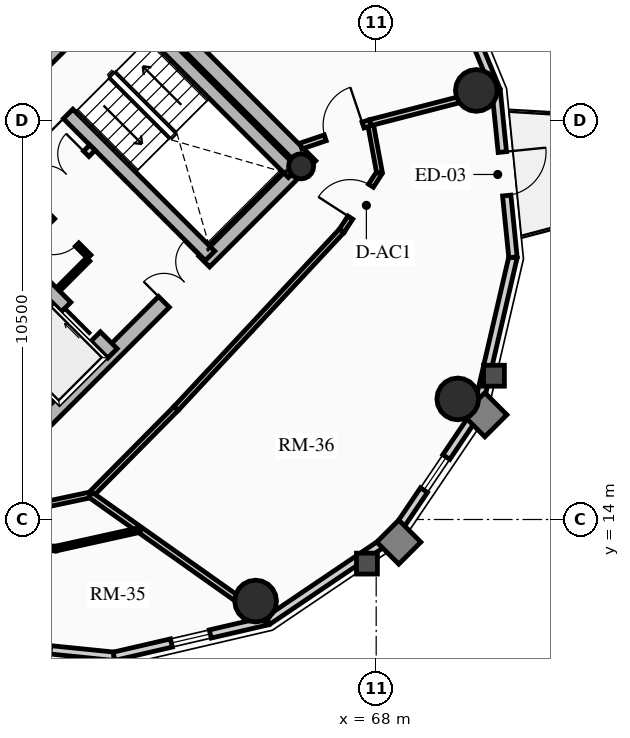
"""IFC4 building model, lengths in metres.
Left out: names, types, materials, properties, quantities, classifications, styles, units other than length and angle.
Written with IfcOpenShell. Run it as: python <this file> out.ifc"""

import sys

from ifc_helpers import new_model, si_unit, direction, frame, frame_2d, origin, origin_2d, place, context, subcontext, project, spatial, rectangle, circle, hollow_circle, extrude, source, transform, mapped, element, fill, save


model = new_model("IFC4")
c1 = context("Model", 3, precision=1e-05, world=origin(), true_north=direction((0.0, 1.0)))
c2 = subcontext(c1, "Body", "Model", "MODEL_VIEW")
j1 = project(units=[si_unit("LENGTHUNIT", "METRE"), si_unit("PLANEANGLEUNIT", "RADIAN")], contexts=[c1])
p1 = place(None, origin())
s1 = spatial("IfcSite", under=j1, at=p1, CompositionType="ELEMENT")
p2 = place(p1, origin())
s2 = spatial("IfcBuilding", under=s1, at=p2, CompositionType="ELEMENT")
p3 = place(p2, frame((0.0, 0.0, 226.05)))
s3 = spatial("IfcBuildingStorey", under=s2, at=p3, CompositionType="ELEMENT", Elevation=226.05)
p4 = place(p3, frame((66.268, 23.298, 0.0), z_axis=(0.0, 0.0, 1.0), x_axis=(-0.707106781187, 0.707106781187, 0.0)))
e1 = element("IfcWall", 1, at=p4, inside=s3, PredefinedType="SHEAR", context=c2, shape_type="SweptSolid", body=[
    extrude(rectangle(XDim=14.1, YDim=0.4, at=frame_2d((7.05, 0.0))), origin(), (0.0, 0.0, 1.0), 3.2),
])
p5 = place(p3, frame((58.561, 15.873, 0.0), z_axis=(0.0, 0.0, 1.0), x_axis=(0.707106781187, 0.707106781187, 0.0)))
e2 = element("IfcWall", 2, at=p5, inside=s3, PredefinedType="SHEAR", context=c2, shape_type="SweptSolid", body=[
    extrude(rectangle(XDim=10.7, YDim=0.4, at=frame_2d((5.35, 0.0))), origin(), (0.0, 0.0, 1.0), 3.2),
])
m1 = source(origin(), c2, "Body", "SweptSolid", [
    extrude(rectangle(XDim=1.5, YDim=2.02, at=frame_2d((0.75, 1.01))), frame((0.0, 0.21, 0.0), z_axis=(0.0, -1.0, 0.0), x_axis=(1.0, 0.0, 0.0)), (0.0, 0.0, 1.0), 0.42),
])
p6 = place(p5, frame((5.45, 0.0, 0.0)))
e3 = element("IfcOpeningElement", 3, at=p6, cuts=e2, PredefinedType="OPENING", context=c2, shape_type="MappedRepresentation", body=[
    mapped(m1, transform((0.0, 0.0, 0.0), x_axis=(1.0, 0.0, 0.0), y_axis=(0.0, 1.0, 0.0), z_axis=(0.0, 0.0, 1.0), scale=1.0)),
])
p7 = place(p3, frame((61.06, 18.373, 0.0), z_axis=(0.0, 0.0, 1.0), x_axis=(-0.707106781187, 0.707106781187, 0.0)))
e4 = element("IfcWall", 4, at=p7, inside=s3, PredefinedType="SHEAR", context=c2, shape_type="SweptSolid", body=[
    extrude(rectangle(XDim=13.7, YDim=0.35, at=frame_2d((6.85, 0.0))), origin(), (0.0, 0.0, 1.0), 3.2),
])
m2 = source(origin(), c2, "Body", "SweptSolid", [
    extrude(rectangle(XDim=1.1, YDim=2.015, at=frame_2d((0.55, 1.007))), frame((0.0, 0.185, 0.0), z_axis=(0.0, -1.0, 0.0), x_axis=(1.0, 0.0, 0.0)), (0.0, 0.0, 1.0), 0.37),
])
p8 = place(p7, frame((4.85, 0.0, 0.0)))
e5 = element("IfcOpeningElement", 5, at=p8, cuts=e4, PredefinedType="OPENING", context=c2, shape_type="MappedRepresentation", body=[
    mapped(m2, transform((0.0, 0.0, 0.0), x_axis=(1.0, 0.0, 0.0), y_axis=(0.0, 1.0, 0.0), z_axis=(0.0, 0.0, 1.0), scale=1.0)),
])
p9 = place(p7, frame((0.625, 0.0, 0.0)))
e6 = element("IfcOpeningElement", 6, at=p9, cuts=e4, PredefinedType="OPENING", context=c2, shape_type="MappedRepresentation", body=[
    mapped(m2, transform((0.0, 0.0, 0.0), x_axis=(1.0, 0.0, 0.0), y_axis=(0.0, 1.0, 0.0), z_axis=(0.0, 0.0, 1.0), scale=1.0)),
])
p10 = place(p7, frame((2.625, 0.0, 0.0)))
e7 = element("IfcOpeningElement", 7, at=p10, cuts=e4, PredefinedType="OPENING", context=c2, shape_type="MappedRepresentation", body=[
    mapped(m2, transform((0.0, 0.0, 0.0), x_axis=(1.0, 0.0, 0.0), y_axis=(0.0, 1.0, 0.0), z_axis=(0.0, 0.0, 1.0), scale=1.0)),
])
m3 = source(origin(), c2, "Body", "SweptSolid", [
    extrude(rectangle(XDim=1.15, YDim=2.02, at=frame_2d((0.575, 1.01))), frame((0.0, 0.185, 0.0), z_axis=(0.0, -1.0, 0.0), x_axis=(1.0, 0.0, 0.0)), (0.0, 0.0, 1.0), 0.37),
])
p11 = place(p7, frame((7.27, 0.0, 0.0)))
e8 = element("IfcOpeningElement", 8, at=p11, cuts=e4, PredefinedType="OPENING", context=c2, shape_type="MappedRepresentation", body=[
    mapped(m3, transform((0.0, 0.0, 0.0), x_axis=(1.0, 0.0, 0.0), y_axis=(0.0, 1.0, 0.0), z_axis=(0.0, 0.0, 1.0), scale=1.0)),
])
p12 = place(p3, frame((63.627, 20.94, 0.0), z_axis=(0.0, 0.0, 1.0), x_axis=(-0.707119496762, 0.707094065383, 0.0)))
e9 = element("IfcWall", 9, at=p12, inside=s3, PredefinedType="SHEAR", context=c2, shape_type="SweptSolid", body=[
    extrude(rectangle(XDim=9.6, YDim=0.35, at=frame_2d((4.8, 0.0))), origin(), (0.0, 0.0, 1.0), 3.2),
])
p13 = place(p12, frame((5.28, 0.0, 0.0)))
e10 = element("IfcOpeningElement", 10, at=p13, cuts=e9, PredefinedType="OPENING", context=c2, shape_type="MappedRepresentation", body=[
    mapped(m3, transform((0.0, 0.0, 0.0), x_axis=(1.0, 0.0, 0.0), y_axis=(0.0, 1.0, 0.0), z_axis=(0.0, 0.0, 1.0), scale=1.0)),
])
p14 = place(p3, frame((65.812, 23.125, 0.0), z_axis=(0.0, 0.0, 1.0), x_axis=(-0.707106781187, 0.707106781187, 0.0)))
e11 = element("IfcWall", 11, at=p14, inside=s3, PredefinedType="SHEAR", context=c2, shape_type="SweptSolid", body=[
    extrude(rectangle(XDim=6.695, YDim=0.35, at=frame_2d((3.348, 0.0))), origin(), (0.0, 0.0, 1.0), 3.2),
])
p15 = place(p3, frame((58.893, 25.674, 0.0), z_axis=(0.0, 0.0, 1.0), x_axis=(0.707106781187, 0.707106781187, 0.0)))
e12 = element("IfcWall", 12, at=p15, inside=s3, PredefinedType="SHEAR", context=c2, shape_type="SweptSolid", body=[
    extrude(rectangle(XDim=3.285, YDim=0.35, at=frame_2d((1.643, 0.0))), origin(), (0.0, 0.0, 1.0), 3.2),
])
p16 = place(p3, frame((66.024, 23.294, 0.0), z_axis=(0.0, 0.0, 1.0), x_axis=(0.707106781187, 0.707106781187, 0.0)))
e13 = element("IfcColumn", 13, at=p16, inside=s3, PredefinedType="COLUMN", context=c2, shape_type="SweptSolid", body=[
    extrude(hollow_circle(Radius=0.33, WallThickness=0.025, at=origin_2d()), origin(), (0.0, 0.0, 1.0), 3.2),
])
for number, where, z_axis, x_axis in (
    (14, (64.827, 11.854, 0.0), (0.0, 0.0, 1.0), (1.0, 0.0, 0.0)),
    (15, (70.146, 17.173, 0.0), (0.0, 0.0, 1.0), (1.0, 0.0, 0.0)),
    (16, (70.635, 25.291, 0.0), (0.0, 0.0, 1.0), (1.0, 0.0, 0.0)),
):
    element("IfcColumn", number, at=place(p3, frame(where, z_axis=z_axis, x_axis=x_axis)), inside=s3, PredefinedType="USERDEFINED", context=c2, shape_type="SweptSolid", body=[
        extrude(circle(Radius=0.55, at=origin_2d()), origin(), (0.0, 0.0, 1.0), 3.2),
    ])
p17 = place(p3, frame((61.1, 10.401, 0.0), z_axis=(0.0, 0.0, 1.0), x_axis=(-0.994929930991, 0.100570534541, 0.0)))
e17 = element("IfcWall", 17, at=p17, inside=s3, PredefinedType="SOLIDWALL", context=c2, shape_type="SweptSolid", body=[
    extrude(rectangle(XDim=4.418, YDim=0.22, at=frame_2d((2.209, 0.0))), origin(), (0.0, 0.0, 1.0), 2.612),
])
m4 = source(origin(), c2, "Body", "SweptSolid", [
    extrude(rectangle(XDim=1.05, YDim=1.3, at=frame_2d((0.525, 0.65))), frame((0.0, 0.12, 0.0), z_axis=(0.0, -1.0, 0.0), x_axis=(1.0, 0.0, 0.0)), (0.0, 0.0, 1.0), 0.24),
])
p18 = place(p17, frame((1.684, 0.0, 0.65)))
e18 = element("IfcOpeningElement", 18, at=p18, cuts=e17, PredefinedType="OPENING", context=c2, shape_type="MappedRepresentation", body=[
    mapped(m4, transform((0.0, 0.0, 0.0), x_axis=(1.0, 0.0, 0.0), y_axis=(0.0, 1.0, 0.0), z_axis=(0.0, 0.0, 1.0), scale=1.0)),
])
p19 = place(p3, frame((65.144, 11.337, 0.0), z_axis=(0.0, 0.0, 1.0), x_axis=(-0.974249228678, -0.225473813158, 0.0)))
e19 = element("IfcWall", 19, at=p19, inside=s3, PredefinedType="SOLIDWALL", context=c2, shape_type="SweptSolid", body=[
    extrude(rectangle(XDim=4.15, YDim=0.22, at=frame_2d((2.075, 0.0))), origin(), (0.0, 0.0, 1.0), 2.612),
])
p20 = place(p19, frame((1.55, 0.0, 0.65)))
e20 = element("IfcOpeningElement", 20, at=p20, cuts=e19, PredefinedType="OPENING", context=c2, shape_type="MappedRepresentation", body=[
    mapped(m4, transform((0.0, 0.0, 0.0), x_axis=(1.0, 0.0, 0.0), y_axis=(0.0, 1.0, 0.0), z_axis=(0.0, 0.0, 1.0), scale=1.0)),
])
p21 = place(p3, frame((68.439, 13.561, 0.0), z_axis=(0.0, 0.0, 1.0), x_axis=(-0.828833723692, -0.559495003079, 0.0)))
e21 = element("IfcWall", 21, at=p21, inside=s3, PredefinedType="SOLIDWALL", context=c2, shape_type="SweptSolid", body=[
    extrude(rectangle(XDim=3.976, YDim=0.22, at=frame_2d((1.988, 0.0))), origin(), (0.0, 0.0, 1.0), 2.612),
])
p22 = place(p3, frame((70.663, 16.856, 0.0), z_axis=(0.0, 0.0, 1.0), x_axis=(-0.559495003079, -0.828833723692, 0.0)))
e22 = element("IfcWall", 22, at=p22, inside=s3, PredefinedType="SOLIDWALL", context=c2, shape_type="SweptSolid", body=[
    extrude(rectangle(XDim=3.976, YDim=0.22, at=frame_2d((1.988, 0.0))), origin(), (0.0, 0.0, 1.0), 2.612),
])
p23 = place(p22, frame((1.463, 0.0, 0.65)))
e23 = element("IfcOpeningElement", 23, at=p23, cuts=e22, PredefinedType="OPENING", context=c2, shape_type="MappedRepresentation", body=[
    mapped(m4, transform((0.0, 0.0, 0.0), x_axis=(1.0, 0.0, 0.0), y_axis=(0.0, 1.0, 0.0), z_axis=(0.0, 0.0, 1.0), scale=1.0)),
])
p24 = place(p3, frame((71.599, 20.9, 0.0), z_axis=(0.0, 0.0, 1.0), x_axis=(-0.225473813158, -0.974249228678, 0.0)))
e24 = element("IfcWall", 24, at=p24, inside=s3, PredefinedType="SOLIDWALL", context=c2, shape_type="SweptSolid", body=[
    extrude(rectangle(XDim=4.15, YDim=0.22, at=frame_2d((2.075, 0.0))), origin(), (0.0, 0.0, 1.0), 2.612),
])
p25 = place(p3, frame((71.155, 25.295, 0.0), z_axis=(0.0, 0.0, 1.0), x_axis=(0.100570534541, -0.994929930991, 0.0)))
e25 = element("IfcWall", 25, at=p25, inside=s3, PredefinedType="SOLIDWALL", context=c2, shape_type="SweptSolid", body=[
    extrude(rectangle(XDim=4.418, YDim=0.22, at=frame_2d((2.209, 0.0))), origin(), (0.0, 0.0, 1.0), 2.612),
])
m5 = source(origin(), c2, "Body", "SweptSolid", [
    extrude(rectangle(XDim=1.15, YDim=2.005, at=frame_2d((0.575, 1.002))), frame((0.0, 0.12, 0.0), z_axis=(0.0, -1.0, 0.0), x_axis=(1.0, 0.0, 0.0)), (0.0, 0.0, 1.0), 0.24),
])
p26 = place(p25, frame((1.634, 0.0, 0.0)))
e26 = element("IfcOpeningElement", 26, at=p26, cuts=e25, PredefinedType="OPENING", context=c2, shape_type="MappedRepresentation", body=[
    mapped(m5, transform((0.0, 0.0, 0.0), x_axis=(1.0, 0.0, 0.0), y_axis=(0.0, 1.0, 0.0), z_axis=(0.0, 0.0, 1.0), scale=1.0)),
])
p27 = place(p3, frame((69.374, 29.613, 0.0), z_axis=(0.0, 0.0, 1.0), x_axis=(0.381309704956, -0.924447353237, 0.0)))
e27 = element("IfcWall", 27, at=p27, inside=s3, PredefinedType="SOLIDWALL", context=c2, shape_type="SweptSolid", body=[
    extrude(rectangle(XDim=4.671, YDim=0.22, at=frame_2d((2.335, 0.0))), origin(), (0.0, 0.0, 1.0), 2.612),
])
p28 = place(p3, frame((58.214, 21.467, 0.0), z_axis=(0.0, 0.0, 1.0), x_axis=(0.707106781187, 0.707106781187, 0.0)))
e28 = element("IfcWall", 28, at=p28, inside=s3, PredefinedType="PARTITIONING", context=c2, shape_type="SweptSolid", body=[
    extrude(rectangle(XDim=3.28, YDim=0.2, at=frame_2d((1.64, 0.0))), origin(), (0.0, 0.0, 1.0), 2.975),
])
m6 = source(origin(), c2, "Body", "SweptSolid", [
    extrude(rectangle(XDim=1.5, YDim=2.02, at=frame_2d((0.75, 1.01))), frame((0.0, 0.11, 0.0), z_axis=(0.0, -1.0, 0.0), x_axis=(1.0, 0.0, 0.0)), (0.0, 0.0, 1.0), 0.22),
])
p29 = place(p28, frame((1.55, 0.0, 0.0)))
e29 = element("IfcOpeningElement", 29, at=p29, cuts=e28, PredefinedType="OPENING", context=c2, shape_type="MappedRepresentation", body=[
    mapped(m6, transform((0.0, 0.0, 0.0), x_axis=(1.0, 0.0, 0.0), y_axis=(0.0, 1.0, 0.0), z_axis=(0.0, 0.0, 1.0), scale=1.0)),
])
p30 = place(p3, frame((60.448, 20.915, 0.0), z_axis=(0.0, 0.0, 1.0), x_axis=(-0.707106781187, 0.707106781187, 0.0)))
e30 = element("IfcWall", 30, at=p30, inside=s3, PredefinedType="PARTITIONING", context=c2, shape_type="SweptSolid", body=[
    extrude(rectangle(XDim=1.87, YDim=0.125, at=frame_2d((0.935, 0.0))), origin(), (0.0, 0.0, 1.0), 2.975),
])
m7 = source(origin(), c2, "Body", "SweptSolid", [
    extrude(rectangle(XDim=0.9, YDim=2.005, at=frame_2d((0.45, 1.002))), frame((0.0, 0.073, 0.0), z_axis=(0.0, -1.0, 0.0), x_axis=(1.0, 0.0, 0.0)), (0.0, 0.0, 1.0), 0.145),
])
p31 = place(p30, frame((0.45, 0.0, 0.0)))
e31 = element("IfcOpeningElement", 31, at=p31, cuts=e30, PredefinedType="OPENING", context=c2, shape_type="MappedRepresentation", body=[
    mapped(m7, transform((0.0, 0.0, 0.0), x_axis=(1.0, 0.0, 0.0), y_axis=(0.0, 1.0, 0.0), z_axis=(0.0, 0.0, 1.0), scale=1.0)),
])
p32 = place(p3, frame((59.643, 20.066, 0.0), z_axis=(0.0, 0.0, 1.0), x_axis=(0.707106781187, 0.707106781187, 0.0)))
e32 = element("IfcWall", 32, at=p32, inside=s3, PredefinedType="PARTITIONING", context=c2, shape_type="SweptSolid", body=[
    extrude(rectangle(XDim=1.1, YDim=0.125, at=frame_2d((0.55, 0.0))), origin(), (0.0, 0.0, 1.0), 2.975),
])
p33 = place(p3, frame((58.983, 14.331, 0.0), z_axis=(0.0, 0.0, 1.0), x_axis=(0.978328007546, 0.207061125397, 0.0)))
e33 = element("IfcWall", 33, at=p33, inside=s3, PredefinedType="PARTITIONING", context=c2, shape_type="SweptSolid", body=[
    extrude(rectangle(XDim=1.534, YDim=0.15, at=frame_2d((0.767, 0.0))), origin(), (0.0, 0.0, 1.0), 2.545),
])
p34 = place(p3, frame((60.484, 14.648, 0.0), z_axis=(0.0, 0.0, 1.0), x_axis=(0.703398221944, 0.710795991383, 0.0)))
e34 = element("IfcWall", 34, at=p34, inside=s3, PredefinedType="PARTITIONING", context=c2, shape_type="SweptSolid", body=[
    extrude(rectangle(XDim=3.201, YDim=0.15, at=frame_2d((1.601, 0.0))), origin(), (0.0, 0.0, 1.0), 2.612),
])
p35 = place(p3, frame((62.736, 16.924, 0.0), z_axis=(0.0, 0.0, 1.0), x_axis=(0.681946700833, 0.731401871219, 0.0)))
e35 = element("IfcWall", 35, at=p35, inside=s3, PredefinedType="PARTITIONING", context=c2, shape_type="SweptSolid", body=[
    extrude(rectangle(XDim=6.393, YDim=0.15, at=frame_2d((3.196, 0.0))), origin(), (0.0, 0.0, 1.0), 2.545),
])
p36 = place(p3, frame((67.095, 21.6, 0.0), z_axis=(0.0, 0.0, 1.0), x_axis=(0.543773190184, 0.839232219137, 0.0)))
e36 = element("IfcWall", 36, at=p36, inside=s3, PredefinedType="PARTITIONING", context=c2, shape_type="SweptSolid", body=[
    extrude(rectangle(XDim=1.823, YDim=0.15, at=frame_2d((0.911, 0.0))), origin(), (0.0, 0.0, 1.0), 2.545),
])
m8 = source(origin(), c2, "Body", "SweptSolid", [
    extrude(rectangle(XDim=1.0, YDim=2.015, at=frame_2d((0.5, 1.007))), frame((0.0, 0.085, 0.0), z_axis=(0.0, -1.0, 0.0), x_axis=(1.0, 0.0, 0.0)), (0.0, 0.0, 1.0), 0.17),
])
p37 = place(p36, frame((0.412, 0.0, 0.0)))
e37 = element("IfcOpeningElement", 37, at=p37, cuts=e36, PredefinedType="OPENING", context=c2, shape_type="MappedRepresentation", body=[
    mapped(m8, transform((0.0, 0.0, 0.0), x_axis=(1.0, 0.0, 0.0), y_axis=(0.0, 1.0, 0.0), z_axis=(0.0, 0.0, 1.0), scale=1.0)),
])
p38 = place(p3, frame((68.086, 23.129, 0.0), z_axis=(0.0, 0.0, 1.0), x_axis=(-0.182004193146, 0.983297754334, 0.0)))
e38 = element("IfcWall", 38, at=p38, inside=s3, PredefinedType="PARTITIONING", context=c2, shape_type="SweptSolid", body=[
    extrude(rectangle(XDim=1.336, YDim=0.15, at=frame_2d((0.668, 0.0))), origin(), (0.0, 0.0, 1.0), 2.612),
])
p39 = place(p3, frame((60.484, 14.648, 0.0), z_axis=(0.0, 0.0, 1.0), x_axis=(0.81605983932, -0.577967420058, 0.0)))
e39 = element("IfcWall", 39, at=p39, inside=s3, PredefinedType="PARTITIONING", context=c2, shape_type="SweptSolid", body=[
    extrude(rectangle(XDim=5.699, YDim=0.16, at=frame_2d((2.85, 0.0))), origin(), (0.0, 0.0, 1.0), 2.612),
])
p40 = place(p3, frame((67.843, 24.443, 0.0), z_axis=(0.0, 0.0, 1.0), x_axis=(0.968303102463, 0.249778105048, 0.0)))
e40 = element("IfcWall", 40, at=p40, inside=s3, PredefinedType="PARTITIONING", context=c2, shape_type="SweptSolid", body=[
    extrude(rectangle(XDim=3.399, YDim=0.16, at=frame_2d((1.7, 0.0))), origin(), (0.0, 0.0, 1.0), 2.612),
])
p41 = place(p3, frame((66.021, 23.828, 0.0), z_axis=(0.0, 0.0, 1.0), x_axis=(0.947522075691, 0.319690344049, 0.0)))
e41 = element("IfcWall", 41, at=p41, inside=s3, PredefinedType="PARTITIONING", context=c2, shape_type="SweptSolid", body=[
    extrude(rectangle(XDim=1.924, YDim=0.16, at=frame_2d((0.962, 0.0))), origin(), (0.0, 0.0, 1.0), 2.545),
])
m9 = source(origin(), c2, "Body", "SweptSolid", [
    extrude(rectangle(XDim=1.05, YDim=2.015, at=frame_2d((0.525, 1.007))), frame((0.0, 0.09, 0.0), z_axis=(0.0, -1.0, 0.0), x_axis=(1.0, 0.0, 0.0)), (0.0, 0.0, 1.0), 0.18),
])
p42 = place(p41, frame((0.674, 0.0, 0.0)))
e42 = element("IfcOpeningElement", 42, at=p42, cuts=e41, PredefinedType="OPENING", context=c2, shape_type="MappedRepresentation", body=[
    mapped(m9, transform((0.0, 0.0, 0.0), x_axis=(1.0, 0.0, 0.0), y_axis=(0.0, 1.0, 0.0), z_axis=(0.0, 0.0, 1.0), scale=1.0)),
])
p43 = place(p3, frame((57.306, 13.312, 0.0), z_axis=(0.0, 0.0, 1.0), x_axis=(0.999437122872, -0.033547539789, 0.0)))
e43 = element("IfcWall", 43, at=p43, inside=s3, PredefinedType="PARTITIONING", context=c2, shape_type="SweptSolid", body=[
    extrude(rectangle(XDim=2.271, YDim=0.125, at=frame_2d((1.135, 0.0))), origin(), (0.0, 0.0, 1.0), 2.612),
])
p44 = place(p3, frame((59.575, 13.236, 0.0), z_axis=(0.0, 0.0, 1.0), x_axis=(0.97628336492, 0.216496631337, 0.0)))
e44 = element("IfcWall", 44, at=p44, inside=s3, PredefinedType="PARTITIONING", context=c2, shape_type="SweptSolid", body=[
    extrude(rectangle(XDim=2.264, YDim=0.125, at=frame_2d((1.132, 0.0))), origin(), (0.0, 0.0, 1.0), 2.545),
])
m10 = source(origin(), c2, "Body", "SweptSolid", [
    extrude(rectangle(XDim=1.05, YDim=1.3, at=frame_2d((0.525, 0.65))), frame((0.0, 0.03, 0.0), z_axis=(0.0, -1.0, 0.0), x_axis=(1.0, 0.0, 0.0)), (0.0, 0.0, 1.0), 0.06),
])
p45 = place(p20, origin())
e45 = element("IfcWindow", 45, at=p45, inside=s3, PartitioningType="SINGLE_PANEL", PredefinedType="WINDOW", context=c2, shape_type="MappedRepresentation", body=[
    mapped(m10, transform((0.0, 0.0, 0.0), x_axis=(1.0, 0.0, 0.0), y_axis=(0.0, 1.0, 0.0), z_axis=(0.0, 0.0, 1.0), scale=1.0)),
])
fill(e20, e45)
p46 = place(p23, origin())
e46 = element("IfcWindow", 46, at=p46, inside=s3, PartitioningType="SINGLE_PANEL", PredefinedType="WINDOW", context=c2, shape_type="MappedRepresentation", body=[
    mapped(m10, transform((0.0, 0.0, 0.0), x_axis=(1.0, 0.0, 0.0), y_axis=(0.0, 1.0, 0.0), z_axis=(0.0, 0.0, 1.0), scale=1.0)),
])
fill(e23, e46)
m11 = source(origin(), c2, "Body", "SweptSolid", [
    extrude(rectangle(XDim=1.15, YDim=2.005, at=frame_2d((0.575, 1.002))), frame((0.0, 0.025, 0.0), z_axis=(0.0, -1.0, 0.0), x_axis=(1.0, 0.0, 0.0)), (0.0, 0.0, 1.0), 0.05),
])
p47 = place(p26, origin())
e47 = element("IfcDoor", 47, at=p47, inside=s3, OperationType="SINGLE_SWING_LEFT", PredefinedType="DOOR", context=c2, shape_type="MappedRepresentation", body=[
    mapped(m11, transform((0.0, 0.0, 0.0), x_axis=(1.0, 0.0, 0.0), y_axis=(0.0, 1.0, 0.0), z_axis=(0.0, 0.0, 1.0), scale=1.0)),
])
fill(e26, e47)
m12 = source(origin(), c2, "Body", "SweptSolid", [
    extrude(rectangle(XDim=1.1, YDim=2.015, at=frame_2d((0.55, 1.007))), frame((0.0, 0.025, 0.0), z_axis=(0.0, -1.0, 0.0), x_axis=(1.0, 0.0, 0.0)), (0.0, 0.0, 1.0), 0.05),
])
p48 = place(p9, origin())
e48 = element("IfcDoor", 48, at=p48, inside=s3, OperationType="SLIDING_TO_RIGHT", PredefinedType="DOOR", context=c2, shape_type="MappedRepresentation", body=[
    mapped(m12, transform((0.0, 0.0, 0.0), x_axis=(1.0, 0.0, 0.0), y_axis=(0.0, 1.0, 0.0), z_axis=(0.0, 0.0, 1.0), scale=1.0)),
])
fill(e6, e48)
m13 = source(origin(), c2, "Body", "SweptSolid", [
    extrude(rectangle(XDim=1.15, YDim=2.02, at=frame_2d((0.575, 1.01))), frame((0.0, 0.025, 0.0), z_axis=(0.0, -1.0, 0.0), x_axis=(1.0, 0.0, 0.0)), (0.0, 0.0, 1.0), 0.05),
])
p49 = place(p13, origin())
e49 = element("IfcDoor", 49, at=p49, inside=s3, OperationType="SINGLE_SWING_LEFT", PredefinedType="DOOR", context=c2, shape_type="MappedRepresentation", body=[
    mapped(m13, transform((0.0, 0.0, 0.0), x_axis=(1.0, 0.0, 0.0), y_axis=(0.0, 1.0, 0.0), z_axis=(0.0, 0.0, 1.0), scale=1.0)),
])
fill(e10, e49)
m14 = source(origin(), c2, "Body", "SweptSolid", [
    extrude(rectangle(XDim=1.5, YDim=2.02, at=frame_2d((0.75, 1.01))), frame((0.0, 0.025, 0.0), z_axis=(0.0, -1.0, 0.0), x_axis=(1.0, 0.0, 0.0)), (0.0, 0.0, 1.0), 0.05),
])
p50 = place(p6, origin())
e50 = element("IfcDoor", 50, at=p50, inside=s3, OperationType="DOUBLE_DOOR_SINGLE_SWING", PredefinedType="DOOR", context=c2, shape_type="MappedRepresentation", body=[
    mapped(m14, transform((0.0, 0.0, 0.0), x_axis=(1.0, 0.0, 0.0), y_axis=(0.0, 1.0, 0.0), z_axis=(0.0, 0.0, 1.0), scale=1.0)),
])
fill(e3, e50)
p51 = place(p29, origin())
e51 = element("IfcDoor", 51, at=p51, inside=s3, OperationType="DOUBLE_DOOR_SINGLE_SWING", PredefinedType="DOOR", context=c2, shape_type="MappedRepresentation", body=[
    mapped(m14, transform((0.0, 0.0, 0.0), x_axis=(1.0, 0.0, 0.0), y_axis=(0.0, 1.0, 0.0), z_axis=(0.0, 0.0, 1.0), scale=1.0)),
])
fill(e29, e51)
m15 = source(origin(), c2, "Body", "SweptSolid", [
    extrude(rectangle(XDim=0.9, YDim=2.005, at=frame_2d((0.45, 1.002))), frame((0.0, 0.025, 0.0), z_axis=(0.0, -1.0, 0.0), x_axis=(1.0, 0.0, 0.0)), (0.0, 0.0, 1.0), 0.05),
])
p52 = place(p31, origin())
e52 = element("IfcDoor", 52, at=p52, inside=s3, OperationType="SINGLE_SWING_RIGHT", PredefinedType="DOOR", context=c2, shape_type="MappedRepresentation", body=[
    mapped(m15, transform((0.0, 0.0, 0.0), x_axis=(1.0, 0.0, 0.0), y_axis=(0.0, 1.0, 0.0), z_axis=(0.0, 0.0, 1.0), scale=1.0)),
])
fill(e31, e52)
m16 = source(origin(), c2, "Body", "SweptSolid", [
    extrude(rectangle(XDim=1.05, YDim=2.015, at=frame_2d((0.525, 1.007))), frame((0.0, 0.025, 0.0), z_axis=(0.0, -1.0, 0.0), x_axis=(1.0, 0.0, 0.0)), (0.0, 0.0, 1.0), 0.05),
])
p53 = place(p42, origin())
e53 = element("IfcDoor", 53, at=p53, inside=s3, OperationType="SINGLE_SWING_RIGHT", PredefinedType="DOOR", context=c2, shape_type="MappedRepresentation", body=[
    mapped(m16, transform((0.0, 0.0, 0.0), x_axis=(1.0, 0.0, 0.0), y_axis=(0.0, 1.0, 0.0), z_axis=(0.0, 0.0, 1.0), scale=1.0)),
])
fill(e42, e53)
m17 = source(origin(), c2, "Body", "SweptSolid", [
    extrude(rectangle(XDim=1.0, YDim=2.015, at=frame_2d((0.5, 1.007))), frame((0.0, 0.025, 0.0), z_axis=(0.0, -1.0, 0.0), x_axis=(1.0, 0.0, 0.0)), (0.0, 0.0, 1.0), 0.05),
])
p54 = place(p37, origin())
e54 = element("IfcDoor", 54, at=p54, inside=s3, OperationType="SINGLE_SWING_LEFT", PredefinedType="DOOR", context=c2, shape_type="MappedRepresentation", body=[
    mapped(m17, transform((0.0, 0.0, 0.0), x_axis=(1.0, 0.0, 0.0), y_axis=(0.0, 1.0, 0.0), z_axis=(0.0, 0.0, 1.0), scale=1.0)),
])
fill(e37, e54)
save(model, sys.argv[1])
